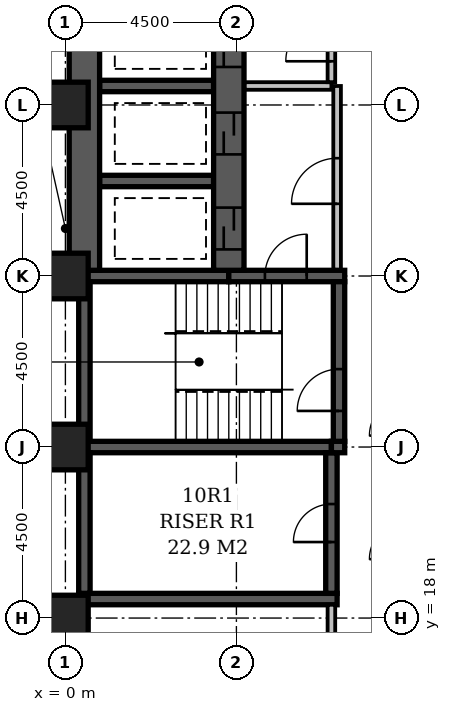
"""IFC4 building model, lengths in metres.
Left out: names, types, materials, properties, quantities, classifications, styles, units other than length and angle.
Written with IfcOpenShell. Run it as: python <this file> out.ifc"""

import sys

from ifc_helpers import new_model, si_unit, direction, frame, frame_2d, origin, origin_2d, place, context, subcontext, project, spatial, rectangle, extrude, element, fill, save


model = new_model("IFC4")
c1 = context("Model", 3, precision=1e-05, world=origin(), true_north=direction((0.0, 1.0)))
c2 = subcontext(c1, "Body", "Model", "MODEL_VIEW")
j1 = project(units=[si_unit("LENGTHUNIT", "METRE"), si_unit("PLANEANGLEUNIT", "RADIAN")], contexts=[c1])
p1 = place(None, origin())
s1 = spatial("IfcSite", under=j1, at=p1, CompositionType="ELEMENT")
p2 = place(p1, origin())
s2 = spatial("IfcBuilding", under=s1, at=p2, CompositionType="ELEMENT")
p3 = place(p2, frame((0.0, 0.0, 47.0)))
s3 = spatial("IfcBuildingStorey", under=s2, at=p3, CompositionType="ELEMENT", Elevation=47.0)
p4 = place(p3, frame((0.35, 18.5, -0.3), z_axis=(0.0, 0.0, 1.0), x_axis=(1.0, 0.0, 0.0)))
e1 = element("IfcWall", 1, at=p4, inside=s3, PredefinedType="SHEAR", context=c2, shape_type="SweptSolid", body=[
    extrude(rectangle(XDim=6.8, YDim=0.3, at=frame_2d((3.4, 0.0))), origin(), (0.0, 0.0, 1.0), 3.6),
])
p5 = place(p3, frame((0.35, 22.5, -0.3), z_axis=(0.0, 0.0, 1.0), x_axis=(1.0, 0.0, 0.0)))
e2 = element("IfcWall", 2, at=p5, inside=s3, PredefinedType="SHEAR", context=c2, shape_type="SweptSolid", body=[
    extrude(rectangle(XDim=6.65, YDim=0.3, at=frame_2d((3.325, 0.0))), origin(), (0.0, 0.0, 1.0), 3.6),
])
p6 = place(p3, frame((0.35, 27.0, -0.3), z_axis=(0.0, 0.0, 1.0), x_axis=(1.0, 0.0, 0.0)))
e3 = element("IfcWall", 3, at=p6, inside=s3, PredefinedType="SHEAR", context=c2, shape_type="SweptSolid", body=[
    extrude(rectangle(XDim=3.95, YDim=0.3, at=frame_2d((1.975, 0.0))), origin(), (0.0, 0.0, 1.0), 3.6),
])
p7 = place(p3, frame((0.5, 18.65, -0.3), z_axis=(0.0, 0.0, 1.0), x_axis=(0.0, 1.0, 0.0)))
e4 = element("IfcWall", 4, at=p7, inside=s3, PredefinedType="SHEAR", context=c2, shape_type="SweptSolid", body=[
    extrude(rectangle(XDim=3.7, YDim=0.3, at=frame_2d((1.85, 0.0))), origin(), (0.0, 0.0, 1.0), 3.6),
])
p8 = place(p3, frame((0.5, 22.65, -0.3), z_axis=(0.0, 0.0, 1.0), x_axis=(0.0, 1.0, 0.0)))
e5 = element("IfcWall", 5, at=p8, inside=s3, PredefinedType="SHEAR", context=c2, shape_type="SweptSolid", body=[
    extrude(rectangle(XDim=4.2, YDim=0.3, at=frame_2d((2.1, 0.0))), origin(), (0.0, 0.0, 1.0), 3.6),
])
p9 = place(p3, frame((0.5, 27.15, -0.3), z_axis=(0.0, 0.0, 1.0), x_axis=(0.0, 1.0, 0.0)))
e6 = element("IfcWall", 6, at=p9, inside=s3, PredefinedType="SHEAR", context=c2, shape_type="SweptSolid", body=[
    extrude(rectangle(XDim=6.95, YDim=0.8, at=frame_2d((3.475, 0.0))), origin(), (0.0, 0.0, 1.0), 3.6),
])
for number, where, z_axis, x_axis in (
    (7, (0.9, 29.5, -0.3), (0.0, 0.0, 1.0), (1.0, 0.0, 0.0)),
    (8, (0.9, 32.0, -0.3), (0.0, 0.0, 1.0), (1.0, 0.0, 0.0)),
):
    element("IfcWall", number, at=place(p3, frame(where, z_axis=z_axis, x_axis=x_axis)), inside=s3, PredefinedType="SHEAR", context=c2, shape_type="SweptSolid", body=[
        extrude(rectangle(XDim=3.0, YDim=0.3, at=frame_2d((1.5, 0.0))), origin(), (0.0, 0.0, 1.0), 3.6),
    ])
p10 = place(p3, frame((4.3, 27.0, -0.3), z_axis=(0.0, 0.0, 1.0), x_axis=(1.0, 0.0, 0.0)))
e9 = element("IfcWall", 9, at=p10, inside=s3, PredefinedType="SHEAR", context=c2, shape_type="SweptSolid", body=[
    extrude(rectangle(XDim=3.05, YDim=0.3, at=frame_2d((1.525, 0.0))), origin(), (0.0, 0.0, 1.0), 3.6),
])
p11 = place(p10, frame((0.95, 0.0, 0.3)))
e10 = element("IfcOpeningElement", 10, at=p11, cuts=e9, PredefinedType="OPENING", context=c2, shape_type="SweptSolid", body=[
    extrude(rectangle(XDim=1.1, YDim=2.1, at=frame_2d((0.55, 1.05))), frame((0.0, 0.162, 0.0), z_axis=(0.0, -1.0, 0.0), x_axis=(1.0, 0.0, 0.0)), (0.0, 0.0, 1.0), 0.324),
])
p12 = place(p3, frame((4.3, 27.15, -0.3), z_axis=(0.0, 0.0, 1.0), x_axis=(0.0, 1.0, 0.0)))
e11 = element("IfcWall", 11, at=p12, inside=s3, PredefinedType="SHEAR", context=c2, shape_type="SweptSolid", body=[
    extrude(rectangle(XDim=6.95, YDim=0.8, at=frame_2d((3.475, 0.0))), origin(), (0.0, 0.0, 1.0), 3.6),
])
p13 = place(p12, frame((3.05, 0.0, 0.3)))
e12 = element("IfcOpeningElement", 12, at=p13, cuts=e11, PredefinedType="OPENING", context=c2, shape_type="SweptSolid", body=[
    extrude(rectangle(XDim=1.1, YDim=2.1, at=frame_2d((0.55, 1.05))), frame((0.0, 0.412, 0.0), z_axis=(0.0, -1.0, 0.0), x_axis=(1.0, 0.0, 0.0)), (0.0, 0.0, 1.0), 0.824),
])
p14 = place(p12, frame((0.55, 0.0, 0.3)))
e13 = element("IfcOpeningElement", 13, at=p14, cuts=e11, PredefinedType="OPENING", context=c2, shape_type="SweptSolid", body=[
    extrude(rectangle(XDim=1.1, YDim=2.1, at=frame_2d((0.55, 1.05))), frame((0.0, 0.412, 0.0), z_axis=(0.0, -1.0, 0.0), x_axis=(1.0, 0.0, 0.0)), (0.0, 0.0, 1.0), 0.824),
])
p15 = place(p12, frame((5.35, 0.0, 0.3)))
e14 = element("IfcOpeningElement", 14, at=p15, cuts=e11, PredefinedType="OPENING", context=c2, shape_type="SweptSolid", body=[
    extrude(rectangle(XDim=1.1, YDim=2.1, at=frame_2d((0.55, 1.05))), frame((0.0, 0.412, 0.0), z_axis=(0.0, -1.0, 0.0), x_axis=(1.0, 0.0, 0.0)), (0.0, 0.0, 1.0), 0.824),
])
p16 = place(p3, frame((7.0, 18.65, -0.3), z_axis=(0.0, 0.0, 1.0), x_axis=(0.0, 1.0, 0.0)))
e15 = element("IfcWall", 15, at=p16, inside=s3, PredefinedType="SHEAR", context=c2, shape_type="SweptSolid", body=[
    extrude(rectangle(XDim=3.7, YDim=0.3, at=frame_2d((1.85, 0.0))), origin(), (0.0, 0.0, 1.0), 3.6),
])
p17 = place(p16, frame((1.35, 0.0, 0.3)))
e16 = element("IfcOpeningElement", 16, at=p17, cuts=e15, PredefinedType="OPENING", context=c2, shape_type="SweptSolid", body=[
    extrude(rectangle(XDim=1.0, YDim=2.1, at=frame_2d((0.5, 1.05))), frame((0.0, 0.162, 0.0), z_axis=(0.0, -1.0, 0.0), x_axis=(1.0, 0.0, 0.0)), (0.0, 0.0, 1.0), 0.324),
])
p18 = place(p3, frame((7.0, 22.5, -0.3), z_axis=(0.0, 0.0, 1.0), x_axis=(1.0, 0.0, 0.0)))
e17 = element("IfcWall", 17, at=p18, inside=s3, PredefinedType="SHEAR", context=c2, shape_type="SweptSolid", body=[
    extrude(rectangle(XDim=0.35, YDim=0.3, at=frame_2d((0.175, 0.0))), origin(), (0.0, 0.0, 1.0), 3.6),
])
p19 = place(p3, frame((7.2, 22.65, -0.3), z_axis=(0.0, 0.0, 1.0), x_axis=(0.0, 1.0, 0.0)))
e18 = element("IfcWall", 18, at=p19, inside=s3, PredefinedType="SHEAR", context=c2, shape_type="SweptSolid", body=[
    extrude(rectangle(XDim=4.2, YDim=0.3, at=frame_2d((2.1, 0.0))), origin(), (0.0, 0.0, 1.0), 3.6),
])
p20 = place(p19, frame((0.8, 0.0, 0.3)))
e19 = element("IfcOpeningElement", 19, at=p20, cuts=e18, PredefinedType="OPENING", context=c2, shape_type="SweptSolid", body=[
    extrude(rectangle(XDim=1.1, YDim=2.1, at=frame_2d((0.55, 1.05))), frame((0.0, 0.162, 0.0), z_axis=(0.0, -1.0, 0.0), x_axis=(1.0, 0.0, 0.0)), (0.0, 0.0, 1.0), 0.324),
])
for number, where, z_axis, x_axis in (
    (20, (0.0, 18.0, -0.3), (0.0, 0.0, 1.0), (1.0, 0.0, 0.0)),
    (21, (0.0, 22.5, -0.3), (0.0, 0.0, 1.0), (1.0, 0.0, 0.0)),
    (22, (0.0, 27.0, -0.3), (0.0, 0.0, 1.0), (1.0, 0.0, 0.0)),
    (23, (0.0, 31.5, -0.3), (0.0, 0.0, 1.0), (1.0, 0.0, 0.0)),
):
    element("IfcColumn", number, at=place(p3, frame(where, z_axis=z_axis, x_axis=x_axis)), inside=s3, PredefinedType="COLUMN", context=c2, shape_type="SweptSolid", body=[
        extrude(rectangle(XDim=1.2, YDim=1.2, at=origin_2d()), origin(), (0.0, 0.0, 1.0), 3.6),
    ])
p21 = place(p3, frame((4.72, 32.0, 0.0), z_axis=(0.0, 0.0, 1.0), x_axis=(1.0, 0.0, 0.0)))
e24 = element("IfcWall", 24, at=p21, inside=s3, PredefinedType="PARTITIONING", context=c2, shape_type="SweptSolid", body=[
    extrude(rectangle(XDim=2.28, YDim=0.2, at=frame_2d((1.14, 0.0))), origin(), (0.0, 0.0, 1.0), 3.3),
])
p22 = place(p3, frame((7.0, 32.1, 0.0), z_axis=(0.0, 0.0, 1.0), x_axis=(0.0, 1.0, 0.0)))
e25 = element("IfcWall", 25, at=p22, inside=s3, PredefinedType="PARTITIONING", context=c2, shape_type="SweptSolid", body=[
    extrude(rectangle(XDim=2.4, YDim=0.2, at=frame_2d((1.2, 0.0))), origin(), (0.0, 0.0, 1.0), 3.3),
])
p23 = place(p22, frame((0.55, 0.0, 0.0)))
e26 = element("IfcOpeningElement", 26, at=p23, cuts=e25, PredefinedType="OPENING", context=c2, shape_type="SweptSolid", body=[
    extrude(rectangle(XDim=1.2, YDim=2.1, at=frame_2d((0.6, 1.05))), frame((0.0, 0.112, 0.0), z_axis=(0.0, -1.0, 0.0), x_axis=(1.0, 0.0, 0.0)), (0.0, 0.0, 1.0), 0.224),
])
p24 = place(p3, frame((7.15, 27.17, 0.0), z_axis=(0.0, 0.0, 1.0), x_axis=(0.0, 1.0, 0.0)))
e27 = element("IfcWall", 27, at=p24, inside=s3, PredefinedType="PARTITIONING", context=c2, shape_type="SweptSolid", body=[
    extrude(rectangle(XDim=4.83, YDim=0.2, at=frame_2d((2.415, 0.0))), origin(), (0.0, 0.0, 1.0), 3.3),
])
p25 = place(p24, frame((1.73, 0.0, 0.0)))
e28 = element("IfcOpeningElement", 28, at=p25, cuts=e27, PredefinedType="OPENING", context=c2, shape_type="SweptSolid", body=[
    extrude(rectangle(XDim=1.2, YDim=2.1, at=frame_2d((0.6, 1.05))), frame((0.0, 0.112, 0.0), z_axis=(0.0, -1.0, 0.0), x_axis=(1.0, 0.0, 0.0)), (0.0, 0.0, 1.0), 0.224),
])
p26 = place(p3, frame((7.0, 14.15, 0.0), z_axis=(0.0, 0.0, 1.0), x_axis=(0.0, 1.0, 0.0)))
e29 = element("IfcWall", 29, at=p26, inside=s3, PredefinedType="PARTITIONING", context=c2, shape_type="SweptSolid", body=[
    extrude(rectangle(XDim=4.2, YDim=0.2, at=frame_2d((2.1, 0.0))), origin(), (0.0, 0.0, 1.0), 3.3),
])
p27 = place(p26, frame((1.65, 0.0, 0.0)))
e30 = element("IfcOpeningElement", 30, at=p27, cuts=e29, PredefinedType="OPENING", context=c2, shape_type="SweptSolid", body=[
    extrude(rectangle(XDim=0.9, YDim=2.1, at=frame_2d((0.45, 1.05))), frame((0.0, 0.112, 0.0), z_axis=(0.0, -1.0, 0.0), x_axis=(1.0, 0.0, 0.0)), (0.0, 0.0, 1.0), 0.224),
])
p28 = place(p25, origin())
e31 = element("IfcDoor", 31, at=p28, inside=s3, OperationType="SINGLE_SWING_LEFT", PredefinedType="DOOR", context=c2, shape_type="SweptSolid", body=[
    extrude(rectangle(XDim=1.2, YDim=2.1, at=frame_2d((0.6, 1.05))), frame((0.0, 0.025, 0.0), z_axis=(0.0, -1.0, 0.0), x_axis=(1.0, 0.0, 0.0)), (0.0, 0.0, 1.0), 0.05),
])
fill(e28, e31)
p29 = place(p13, origin())
e32 = element("IfcDoor", 32, at=p29, inside=s3, OperationType="SLIDING_TO_LEFT", PredefinedType="DOOR", context=c2, shape_type="SweptSolid", body=[
    extrude(rectangle(XDim=1.1, YDim=2.1, at=frame_2d((0.55, 1.05))), frame((0.0, 0.025, 0.0), z_axis=(0.0, -1.0, 0.0), x_axis=(1.0, 0.0, 0.0)), (0.0, 0.0, 1.0), 0.05),
])
fill(e12, e32)
p30 = place(p14, origin())
e33 = element("IfcDoor", 33, at=p30, inside=s3, OperationType="SLIDING_TO_LEFT", PredefinedType="DOOR", context=c2, shape_type="SweptSolid", body=[
    extrude(rectangle(XDim=1.1, YDim=2.1, at=frame_2d((0.55, 1.05))), frame((0.0, 0.025, 0.0), z_axis=(0.0, -1.0, 0.0), x_axis=(1.0, 0.0, 0.0)), (0.0, 0.0, 1.0), 0.05),
])
fill(e13, e33)
p31 = place(p23, origin())
e34 = element("IfcDoor", 34, at=p31, inside=s3, OperationType="SINGLE_SWING_LEFT", PredefinedType="DOOR", context=c2, shape_type="SweptSolid", body=[
    extrude(rectangle(XDim=1.2, YDim=2.1, at=frame_2d((0.6, 1.05))), frame((0.0, 0.025, 0.0), z_axis=(0.0, -1.0, 0.0), x_axis=(1.0, 0.0, 0.0)), (0.0, 0.0, 1.0), 0.05),
])
fill(e26, e34)
p32 = place(p15, origin())
e35 = element("IfcDoor", 35, at=p32, inside=s3, OperationType="SLIDING_TO_LEFT", PredefinedType="DOOR", context=c2, shape_type="SweptSolid", body=[
    extrude(rectangle(XDim=1.1, YDim=2.1, at=frame_2d((0.55, 1.05))), frame((0.0, 0.025, 0.0), z_axis=(0.0, -1.0, 0.0), x_axis=(1.0, 0.0, 0.0)), (0.0, 0.0, 1.0), 0.05),
])
fill(e14, e35)
p33 = place(p17, origin())
e36 = element("IfcDoor", 36, at=p33, inside=s3, OperationType="SINGLE_SWING_LEFT", PredefinedType="DOOR", context=c2, shape_type="SweptSolid", body=[
    extrude(rectangle(XDim=1.0, YDim=2.1, at=frame_2d((0.5, 1.05))), frame((0.0, 0.025, 0.0), z_axis=(0.0, -1.0, 0.0), x_axis=(1.0, 0.0, 0.0)), (0.0, 0.0, 1.0), 0.05),
])
fill(e16, e36)
p34 = place(p11, frame((1.1, 0.0, 0.0), z_axis=(0.0, 0.0, 1.0), x_axis=(-1.0, 0.0, 0.0)))
e37 = element("IfcDoor", 37, at=p34, inside=s3, OperationType="SINGLE_SWING_LEFT", PredefinedType="DOOR", context=c2, shape_type="SweptSolid", body=[
    extrude(rectangle(XDim=1.1, YDim=2.1, at=frame_2d((0.55, 1.05))), frame((0.0, 0.025, 0.0), z_axis=(0.0, -1.0, 0.0), x_axis=(1.0, 0.0, 0.0)), (0.0, 0.0, 1.0), 0.05),
])
fill(e10, e37)
p35 = place(p20, origin())
e38 = element("IfcDoor", 38, at=p35, inside=s3, OperationType="SINGLE_SWING_LEFT", PredefinedType="DOOR", context=c2, shape_type="SweptSolid", body=[
    extrude(rectangle(XDim=1.1, YDim=2.1, at=frame_2d((0.55, 1.05))), frame((0.0, 0.025, 0.0), z_axis=(0.0, -1.0, 0.0), x_axis=(1.0, 0.0, 0.0)), (0.0, 0.0, 1.0), 0.05),
])
fill(e19, e38)
save(model, sys.argv[1])
